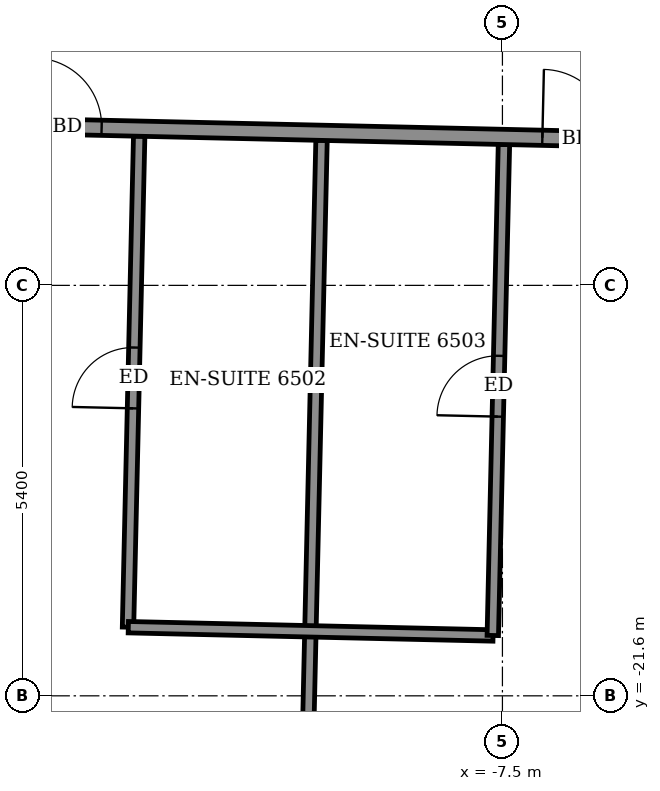
"""IFC4 building model, lengths in metres.
Left out: names, types, materials, properties, quantities, classifications, styles, units other than length and angle.
Written with IfcOpenShell. Run it as: python <this file> out.ifc"""

import sys

from ifc_helpers import new_model, si_unit, direction, frame, frame_2d, origin, place, context, subcontext, project, spatial, rectangle, extrude, element, fill, save


model = new_model("IFC4")
c1 = context("Model", 3, precision=1e-05, world=origin(), true_north=direction((0.0, 1.0)))
c2 = subcontext(c1, "Body", "Model", "MODEL_VIEW")
j1 = project(units=[si_unit("LENGTHUNIT", "METRE"), si_unit("PLANEANGLEUNIT", "RADIAN")], contexts=[c1])
p1 = place(None, origin())
s1 = spatial("IfcSite", under=j1, at=p1, CompositionType="ELEMENT")
p2 = place(p1, origin())
s2 = spatial("IfcBuilding", under=s1, at=p2, CompositionType="ELEMENT")
p3 = place(p2, frame((0.0, 0.0, 257.3)))
s3 = spatial("IfcBuildingStorey", under=s2, at=p3, CompositionType="ELEMENT", Elevation=257.3)
p4 = place(p3, frame((-10.161, -26.69, 0.0), z_axis=(0.0, 0.0, 1.0), x_axis=(0.022661475803, 0.999743195783, 0.0)))
e1 = element("IfcWall", 1, at=p4, inside=s3, PredefinedType="PARTITIONING", context=c2, shape_type="SweptSolid", body=[
    extrude(rectangle(XDim=12.4, YDim=0.15, at=frame_2d((6.2, 0.0))), origin(), (0.0, 0.0, 1.0), 2.55),
])
p5 = place(p3, frame((-12.426, -20.697, 0.0), z_axis=(0.0, 0.0, 1.0), x_axis=(0.02274887394, 0.999741210881, 0.0)))
e2 = element("IfcWall", 2, at=p5, inside=s3, PredefinedType="PARTITIONING", context=c2, shape_type="SweptSolid", body=[
    extrude(rectangle(XDim=6.461, YDim=0.15, at=frame_2d((3.23, 0.0))), origin(), (0.0, 0.0, 1.0), 3.05),
])
p6 = place(p5, frame((2.88, 0.0, 0.0)))
e3 = element("IfcOpeningElement", 3, at=p6, cuts=e2, PredefinedType="OPENING", context=c2, shape_type="SweptSolid", body=[
    extrude(rectangle(XDim=0.8, YDim=2.1, at=frame_2d((0.4, 1.05))), frame((0.0, 0.085, 0.0), z_axis=(0.0, -1.0, 0.0), x_axis=(1.0, 0.0, 0.0)), (0.0, 0.0, 1.0), 0.17),
])
p7 = place(p3, frame((-12.422, -20.697, 0.0), z_axis=(0.0, 0.0, 1.0), x_axis=(0.999742701292, -0.022683280499, 0.0)))
e4 = element("IfcWall", 4, at=p7, inside=s3, PredefinedType="PARTITIONING", context=c2, shape_type="SweptSolid", body=[
    extrude(rectangle(XDim=4.8, YDim=0.15, at=frame_2d((2.4, 0.0))), origin(), (0.0, 0.0, 1.0), 3.05),
])
p8 = place(p3, frame((-7.627, -20.806, 0.0), z_axis=(0.0, 0.0, 1.0), x_axis=(0.02274887394, 0.999741210881, 0.0)))
e5 = element("IfcWall", 5, at=p8, inside=s3, PredefinedType="PARTITIONING", context=c2, shape_type="SweptSolid", body=[
    extrude(rectangle(XDim=6.461, YDim=0.15, at=frame_2d((3.23, 0.0))), origin(), (0.0, 0.0, 1.0), 3.05),
])
p9 = place(p8, frame((2.88, 0.0, 0.0)))
e6 = element("IfcOpeningElement", 6, at=p9, cuts=e5, PredefinedType="OPENING", context=c2, shape_type="SweptSolid", body=[
    extrude(rectangle(XDim=0.8, YDim=2.1, at=frame_2d((0.4, 1.05))), frame((0.0, 0.085, 0.0), z_axis=(0.0, -1.0, 0.0), x_axis=(1.0, 0.0, 0.0)), (0.0, 0.0, 1.0), 0.17),
])
p10 = place(p3, frame((-25.12, -13.847, 0.0), z_axis=(0.0, 0.0, 1.0), x_axis=(0.999742852445, -0.022676617578, 0.0)))
e7 = element("IfcWall", 7, at=p10, inside=s3, PredefinedType="PARTITIONING", context=c2, shape_type="SweptSolid", body=[
    extrude(rectangle(XDim=52.873, YDim=0.2, at=frame_2d((26.437, 0.0))), origin(), (0.0, 0.0, 1.0), 3.05),
])
p11 = place(p10, frame((0.725, 0.0, 0.0)))
e8 = element("IfcOpeningElement", 8, at=p11, cuts=e7, PredefinedType="OPENING", context=c2, shape_type="SweptSolid", body=[
    extrude(rectangle(XDim=1.0, YDim=2.1, at=frame_2d((0.5, 1.05))), frame((0.0, 0.11, 0.0), z_axis=(0.0, -1.0, 0.0), x_axis=(1.0, 0.0, 0.0)), (0.0, 0.0, 1.0), 0.22),
])
p12 = place(p10, frame((5.1, 0.0, 0.0)))
e9 = element("IfcOpeningElement", 9, at=p12, cuts=e7, PredefinedType="OPENING", context=c2, shape_type="SweptSolid", body=[
    extrude(rectangle(XDim=0.9, YDim=2.1, at=frame_2d((0.45, 1.05))), frame((0.0, 0.11, 0.0), z_axis=(0.0, -1.0, 0.0), x_axis=(1.0, 0.0, 0.0)), (0.0, 0.0, 1.0), 0.22),
])
p13 = place(p10, frame((9.6, 0.0, 0.0)))
e10 = element("IfcOpeningElement", 10, at=p13, cuts=e7, PredefinedType="OPENING", context=c2, shape_type="SweptSolid", body=[
    extrude(rectangle(XDim=0.9, YDim=2.1, at=frame_2d((0.45, 1.05))), frame((0.0, 0.11, 0.0), z_axis=(0.0, -1.0, 0.0), x_axis=(1.0, 0.0, 0.0)), (0.0, 0.0, 1.0), 0.22),
])
p14 = place(p10, frame((11.45, 0.0, 0.0)))
e11 = element("IfcOpeningElement", 11, at=p14, cuts=e7, PredefinedType="OPENING", context=c2, shape_type="SweptSolid", body=[
    extrude(rectangle(XDim=0.9, YDim=2.1, at=frame_2d((0.45, 1.05))), frame((0.0, 0.11, 0.0), z_axis=(0.0, -1.0, 0.0), x_axis=(1.0, 0.0, 0.0)), (0.0, 0.0, 1.0), 0.22),
])
p15 = place(p10, frame((18.15, 0.0, 0.0)))
e12 = element("IfcOpeningElement", 12, at=p15, cuts=e7, PredefinedType="OPENING", context=c2, shape_type="SweptSolid", body=[
    extrude(rectangle(XDim=0.9, YDim=2.1, at=frame_2d((0.45, 1.05))), frame((0.0, 0.11, 0.0), z_axis=(0.0, -1.0, 0.0), x_axis=(1.0, 0.0, 0.0)), (0.0, 0.0, 1.0), 0.22),
])
p16 = place(p10, frame((20.05, 0.0, 0.0)))
e13 = element("IfcOpeningElement", 13, at=p16, cuts=e7, PredefinedType="OPENING", context=c2, shape_type="SweptSolid", body=[
    extrude(rectangle(XDim=0.9, YDim=2.1, at=frame_2d((0.45, 1.05))), frame((0.0, 0.11, 0.0), z_axis=(0.0, -1.0, 0.0), x_axis=(1.0, 0.0, 0.0)), (0.0, 0.0, 1.0), 0.22),
])
p17 = place(p10, frame((26.775, 0.0, 0.0)))
e14 = element("IfcOpeningElement", 14, at=p17, cuts=e7, PredefinedType="OPENING", context=c2, shape_type="SweptSolid", body=[
    extrude(rectangle(XDim=0.9, YDim=2.1, at=frame_2d((0.45, 1.05))), frame((0.0, 0.11, 0.0), z_axis=(0.0, -1.0, 0.0), x_axis=(1.0, 0.0, 0.0)), (0.0, 0.0, 1.0), 0.22),
])
p18 = place(p10, frame((28.675, 0.0, 0.0)))
e15 = element("IfcOpeningElement", 15, at=p18, cuts=e7, PredefinedType="OPENING", context=c2, shape_type="SweptSolid", body=[
    extrude(rectangle(XDim=0.9, YDim=2.1, at=frame_2d((0.45, 1.05))), frame((0.0, 0.11, 0.0), z_axis=(0.0, -1.0, 0.0), x_axis=(1.0, 0.0, 0.0)), (0.0, 0.0, 1.0), 0.22),
])
p19 = place(p10, frame((35.35, 0.0, 0.0)))
e16 = element("IfcOpeningElement", 16, at=p19, cuts=e7, PredefinedType="OPENING", context=c2, shape_type="SweptSolid", body=[
    extrude(rectangle(XDim=0.9, YDim=2.1, at=frame_2d((0.45, 1.05))), frame((0.0, 0.11, 0.0), z_axis=(0.0, -1.0, 0.0), x_axis=(1.0, 0.0, 0.0)), (0.0, 0.0, 1.0), 0.22),
])
p20 = place(p10, frame((37.225, 0.0, 0.0)))
e17 = element("IfcOpeningElement", 17, at=p20, cuts=e7, PredefinedType="OPENING", context=c2, shape_type="SweptSolid", body=[
    extrude(rectangle(XDim=0.9, YDim=2.1, at=frame_2d((0.45, 1.05))), frame((0.0, 0.11, 0.0), z_axis=(0.0, -1.0, 0.0), x_axis=(1.0, 0.0, 0.0)), (0.0, 0.0, 1.0), 0.22),
])
p21 = place(p10, frame((43.85, 0.0, 0.0)))
e18 = element("IfcOpeningElement", 18, at=p21, cuts=e7, PredefinedType="OPENING", context=c2, shape_type="SweptSolid", body=[
    extrude(rectangle(XDim=0.9, YDim=2.1, at=frame_2d((0.45, 1.05))), frame((0.0, 0.11, 0.0), z_axis=(0.0, -1.0, 0.0), x_axis=(1.0, 0.0, 0.0)), (0.0, 0.0, 1.0), 0.22),
])
p22 = place(p10, frame((50.786, 0.0, 0.0)))
e19 = element("IfcOpeningElement", 19, at=p22, cuts=e7, PredefinedType="OPENING", context=c2, shape_type="SweptSolid", body=[
    extrude(rectangle(XDim=1.0, YDim=2.1, at=frame_2d((0.5, 1.05))), frame((0.0, 0.11, 0.0), z_axis=(0.0, -1.0, 0.0), x_axis=(1.0, 0.0, 0.0)), (0.0, 0.0, 1.0), 0.22),
])
p23 = place(p10, frame((46.05, 0.0, 0.0)))
e20 = element("IfcOpeningElement", 20, at=p23, cuts=e7, PredefinedType="OPENING", context=c2, shape_type="SweptSolid", body=[
    extrude(rectangle(XDim=0.9, YDim=2.1, at=frame_2d((0.45, 1.05))), frame((0.0, 0.11, 0.0), z_axis=(0.0, -1.0, 0.0), x_axis=(1.0, 0.0, 0.0)), (0.0, 0.0, 1.0), 0.22),
])
p24 = place(p14, origin())
e21 = element("IfcDoor", 21, at=p24, inside=s3, OperationType="SINGLE_SWING_RIGHT", PredefinedType="DOOR", context=c2, shape_type="SweptSolid", body=[
    extrude(rectangle(XDim=0.9, YDim=2.1, at=frame_2d((0.45, 1.05))), frame((0.0, 0.025, 0.0), z_axis=(0.0, -1.0, 0.0), x_axis=(1.0, 0.0, 0.0)), (0.0, 0.0, 1.0), 0.05),
])
fill(e11, e21)
p25 = place(p6, origin())
e22 = element("IfcDoor", 22, at=p25, inside=s3, OperationType="SINGLE_SWING_RIGHT", PredefinedType="DOOR", context=c2, shape_type="SweptSolid", body=[
    extrude(rectangle(XDim=0.8, YDim=2.1, at=frame_2d((0.4, 1.05))), frame((0.0, 0.025, 0.0), z_axis=(0.0, -1.0, 0.0), x_axis=(1.0, 0.0, 0.0)), (0.0, 0.0, 1.0), 0.05),
])
fill(e3, e22)
p26 = place(p15, origin())
e23 = element("IfcDoor", 23, at=p26, inside=s3, OperationType="SINGLE_SWING_LEFT", PredefinedType="DOOR", context=c2, shape_type="SweptSolid", body=[
    extrude(rectangle(XDim=0.9, YDim=2.1, at=frame_2d((0.45, 1.05))), frame((0.0, 0.025, 0.0), z_axis=(0.0, -1.0, 0.0), x_axis=(1.0, 0.0, 0.0)), (0.0, 0.0, 1.0), 0.05),
])
fill(e12, e23)
p27 = place(p9, origin())
e24 = element("IfcDoor", 24, at=p27, inside=s3, OperationType="SINGLE_SWING_LEFT", PredefinedType="DOOR", context=c2, shape_type="SweptSolid", body=[
    extrude(rectangle(XDim=0.8, YDim=2.1, at=frame_2d((0.4, 1.05))), frame((0.0, 0.025, 0.0), z_axis=(0.0, -1.0, 0.0), x_axis=(1.0, 0.0, 0.0)), (0.0, 0.0, 1.0), 0.05),
])
fill(e6, e24)
save(model, sys.argv[1])
